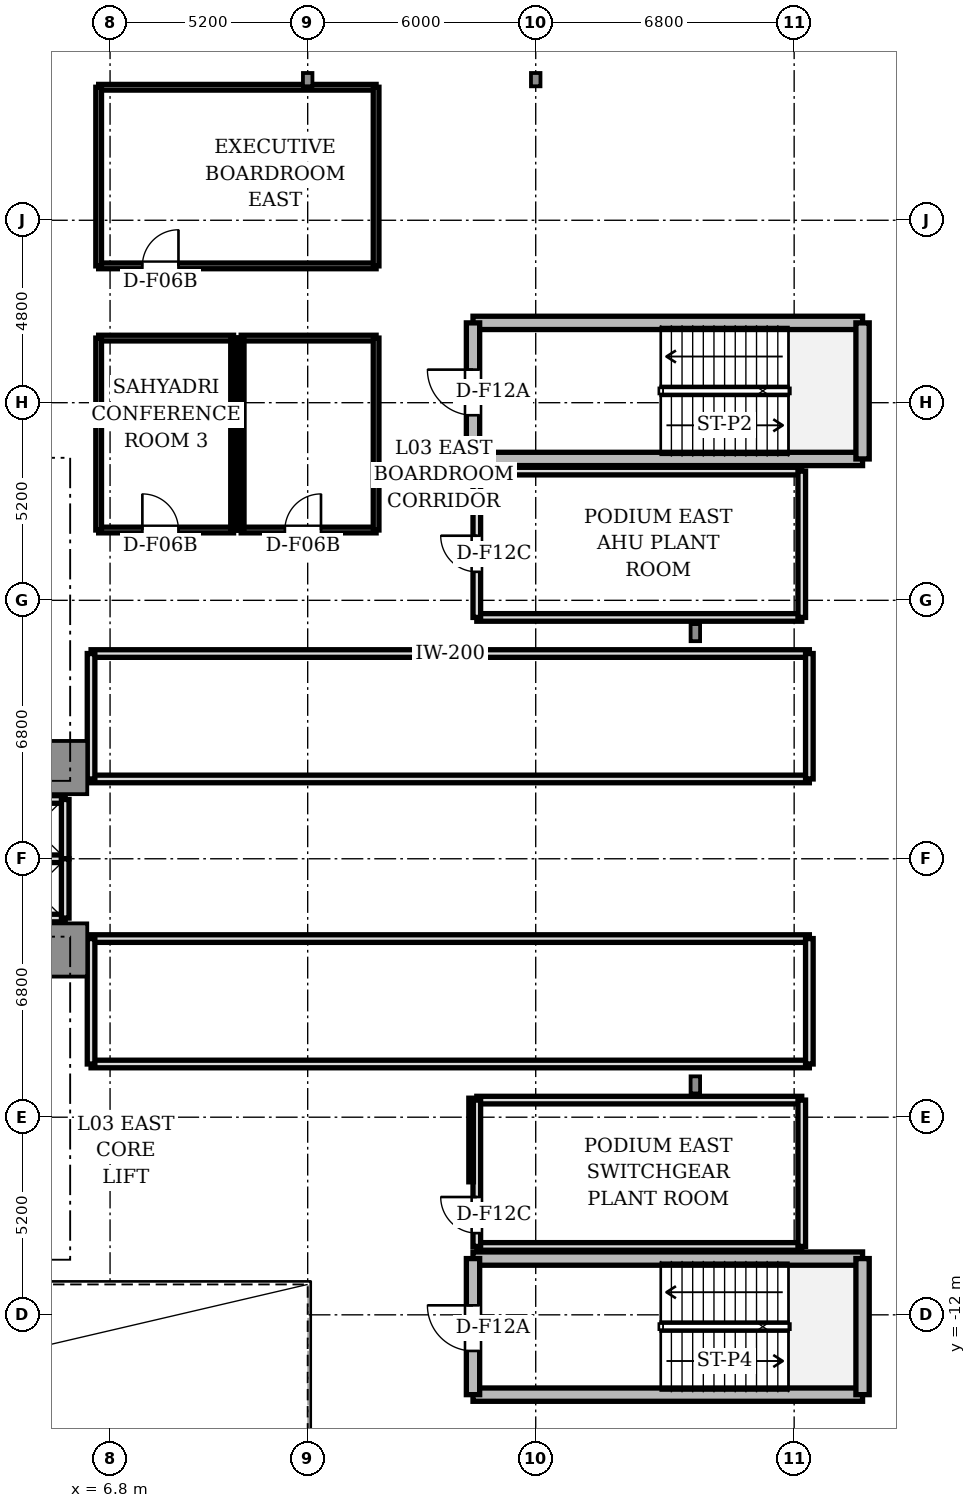
"""IFC4 building model, lengths in metres.
Left out: names, types, materials, properties, quantities, classifications, styles, units other than length and angle.
Written with IfcOpenShell. Run it as: python <this file> out.ifc"""

import sys

from ifc_helpers import new_model, si_unit, direction, frame, frame_2d, origin, origin_2d, place, context, subcontext, project, spatial, rectangle, i_section, extrude, source, transform, mapped, element, fill, save


model = new_model("IFC4")
c1 = context("Model", 3, precision=1e-05, world=origin(), true_north=direction((0.0, 1.0)))
c2 = subcontext(c1, "Body", "Model", "MODEL_VIEW")
j1 = project(units=[si_unit("LENGTHUNIT", "METRE"), si_unit("PLANEANGLEUNIT", "RADIAN")], contexts=[c1])
p1 = place(None, origin())
s1 = spatial("IfcSite", under=j1, at=p1, CompositionType="ELEMENT")
p2 = place(p1, origin())
s2 = spatial("IfcBuilding", under=s1, at=p2, CompositionType="ELEMENT")
p3 = place(p2, frame((0.0, 0.0, 14.1)))
s3 = spatial("IfcBuildingStorey", under=s2, at=p3, CompositionType="ELEMENT", Elevation=14.1)
m1 = source(origin(), c2, "Body", "SweptSolid", [
    extrude(rectangle(XDim=1.4, YDim=1.4, at=origin_2d()), origin(), (0.0, 0.0, 1.0), 4.18),
])
for number, where, z_axis, x_axis in (
    (1, (5.5, 2.4, 0.0), (0.0, 0.0, 1.0), (1.0, 0.0, 0.0)),
    (2, (5.5, -2.4, 0.0), (0.0, 0.0, 1.0), (1.0, 0.0, 0.0)),
):
    element("IfcColumn", number, at=place(p3, frame(where, z_axis=z_axis, x_axis=x_axis)), inside=s3, PredefinedType="COLUMN", context=c2, shape_type="MappedRepresentation", body=[
        mapped(m1, transform((0.0, 0.0, 0.0), scale=1.0)),
    ])
m2 = source(origin(), c2, "Body", "SweptSolid", [
    extrude(i_section(OverallWidth=0.25, OverallDepth=0.45, WebThickness=0.014, FlangeThickness=0.014, FilletRadius=0.015, at=origin_2d()), origin(), (0.0, 0.0, 1.0), 4.18),
])
for number, where, z_axis, x_axis in (
    (3, (22.2, -5.95, 0.0), (0.0, 0.0, 1.0), (1.0, 0.0, 0.0)),
    (4, (22.2, 5.95, 0.0), (0.0, 0.0, 1.0), (1.0, 0.0, 0.0)),
):
    element("IfcColumn", number, at=place(p3, frame(where, z_axis=z_axis, x_axis=x_axis)), inside=s3, PredefinedType="COLUMN", context=c2, shape_type="MappedRepresentation", body=[
        mapped(m2, transform((0.0, 0.0, 0.0), scale=1.0)),
    ])
m3 = source(origin(), c2, "Body", "SweptSolid", [
    extrude(i_section(OverallWidth=0.25, OverallDepth=0.35, WebThickness=0.012, FlangeThickness=0.012, FilletRadius=0.012, at=origin_2d()), origin(), (0.0, 0.0, 1.0), 4.18),
])
for number, where, z_axis, x_axis in (
    (5, (12.0, 20.5, 0.0), (0.0, 0.0, 1.0), (1.0, 0.0, 0.0)),
    (6, (18.0, 20.5, 0.0), (0.0, 0.0, 1.0), (1.0, 0.0, 0.0)),
):
    element("IfcColumn", number, at=place(p3, frame(where, z_axis=z_axis, x_axis=x_axis)), inside=s3, PredefinedType="COLUMN", context=c2, shape_type="MappedRepresentation", body=[
        mapped(m3, transform((0.0, 0.0, 0.0), scale=1.0)),
    ])
for number, where, z_axis, x_axis in (
    (7, (3.98, 1.56, 0.0), (0.0, 0.0, 1.0), (1.0, 0.0, 0.0)),
    (8, (3.98, -1.56, 0.0), (0.0, 0.0, 1.0), (1.0, 0.0, 0.0)),
    (9, (3.98, 0.0, 0.0), (0.0, 0.0, 1.0), (1.0, 0.0, 0.0)),
):
    element("IfcWall", number, at=place(p3, frame(where, z_axis=z_axis, x_axis=x_axis)), inside=s3, PredefinedType="SOLIDWALL", context=c2, shape_type="SweptSolid", body=[
        extrude(rectangle(XDim=1.64, YDim=0.2, at=frame_2d((0.82, 0.0))), origin(), (0.0, 0.0, 1.0), 3.73),
    ])
for number, where, z_axis, x_axis in (
    (10, (5.62, 0.0, 0.0), (0.0, 0.0, 1.0), (0.0, 1.0, 0.0)),
    (11, (5.62, -1.56, 0.0), (0.0, 0.0, 1.0), (0.0, 1.0, 0.0)),
):
    element("IfcWall", number, at=place(p3, frame(where, z_axis=z_axis, x_axis=x_axis)), inside=s3, PredefinedType="SOLIDWALL", context=c2, shape_type="SweptSolid", body=[
        extrude(rectangle(XDim=1.56, YDim=0.2, at=frame_2d((0.78, 0.0))), origin(), (0.0, 0.0, 1.0), 3.73),
    ])
for number, where, z_axis, x_axis in (
    (12, (16.35, 14.1, 0.0), (0.0, 0.0, 1.0), (1.0, 0.0, 0.0)),
    (13, (16.35, 10.52, 0.0), (0.0, 0.0, 1.0), (1.0, 0.0, 0.0)),
):
    element("IfcWall", number, at=place(p3, frame(where, z_axis=z_axis, x_axis=x_axis)), inside=s3, PredefinedType="SHEAR", context=c2, shape_type="SweptSolid", body=[
        extrude(rectangle(XDim=10.25, YDim=0.35, at=frame_2d((5.125, 0.0))), origin(), (0.0, 0.0, 1.0), 4.18),
    ])
p4 = place(p3, frame((16.35, 10.52, 0.0), z_axis=(0.0, 0.0, 1.0), x_axis=(0.0, 1.0, 0.0)))
e14 = element("IfcWall", 14, at=p4, inside=s3, PredefinedType="SHEAR", context=c2, shape_type="SweptSolid", body=[
    extrude(rectangle(XDim=3.58, YDim=0.35, at=frame_2d((1.79, 0.0))), origin(), (0.0, 0.0, 1.0), 4.18),
])
p5 = place(p4, frame((1.15, 0.0, 0.0)))
e15 = element("IfcOpeningElement", 15, at=p5, cuts=e14, PredefinedType="OPENING", context=c2, shape_type="SweptSolid", body=[
    extrude(rectangle(XDim=1.2, YDim=2.2, at=frame_2d((0.6, 1.1))), frame((0.0, 0.185, 0.0), z_axis=(0.0, -1.0, 0.0), x_axis=(1.0, 0.0, 0.0)), (0.0, 0.0, 1.0), 0.37),
])
p6 = place(p3, frame((26.6, 10.52, 0.0), z_axis=(0.0, 0.0, 1.0), x_axis=(0.0, 1.0, 0.0)))
e16 = element("IfcWall", 16, at=p6, inside=s3, PredefinedType="SHEAR", context=c2, shape_type="SweptSolid", body=[
    extrude(rectangle(XDim=3.58, YDim=0.35, at=frame_2d((1.79, 0.0))), origin(), (0.0, 0.0, 1.0), 4.18),
])
for number, where, z_axis, x_axis in (
    (17, (16.35, -10.52, 0.0), (0.0, 0.0, 1.0), (1.0, 0.0, 0.0)),
    (18, (16.35, -14.1, 0.0), (0.0, 0.0, 1.0), (1.0, 0.0, 0.0)),
):
    element("IfcWall", number, at=place(p3, frame(where, z_axis=z_axis, x_axis=x_axis)), inside=s3, PredefinedType="SHEAR", context=c2, shape_type="SweptSolid", body=[
        extrude(rectangle(XDim=10.25, YDim=0.35, at=frame_2d((5.125, 0.0))), origin(), (0.0, 0.0, 1.0), 4.18),
    ])
p7 = place(p3, frame((16.35, -14.1, 0.0), z_axis=(0.0, 0.0, 1.0), x_axis=(0.0, 1.0, 0.0)))
e19 = element("IfcWall", 19, at=p7, inside=s3, PredefinedType="SHEAR", context=c2, shape_type="SweptSolid", body=[
    extrude(rectangle(XDim=3.58, YDim=0.35, at=frame_2d((1.79, 0.0))), origin(), (0.0, 0.0, 1.0), 4.18),
])
p8 = place(p7, frame((1.15, 0.0, 0.0)))
e20 = element("IfcOpeningElement", 20, at=p8, cuts=e19, PredefinedType="OPENING", context=c2, shape_type="SweptSolid", body=[
    extrude(rectangle(XDim=1.2, YDim=2.2, at=frame_2d((0.6, 1.1))), frame((0.0, 0.185, 0.0), z_axis=(0.0, -1.0, 0.0), x_axis=(1.0, 0.0, 0.0)), (0.0, 0.0, 1.0), 0.37),
])
p9 = place(p3, frame((26.6, -14.1, 0.0), z_axis=(0.0, 0.0, 1.0), x_axis=(0.0, 1.0, 0.0)))
e21 = element("IfcWall", 21, at=p9, inside=s3, PredefinedType="SHEAR", context=c2, shape_type="SweptSolid", body=[
    extrude(rectangle(XDim=3.58, YDim=0.35, at=frame_2d((1.79, 0.0))), origin(), (0.0, 0.0, 1.0), 4.18),
])
for number, where, z_axis, x_axis in (
    (22, (6.3, 5.4, 0.0), (0.0, 0.0, 1.0), (1.0, 0.0, 0.0)),
    (23, (6.3, 2.1, 0.0), (0.0, 0.0, 1.0), (1.0, 0.0, 0.0)),
):
    element("IfcWall", number, at=place(p3, frame(where, z_axis=z_axis, x_axis=x_axis)), inside=s3, PredefinedType="SOLIDWALL", context=c2, shape_type="SweptSolid", body=[
        extrude(rectangle(XDim=18.9, YDim=0.2, at=frame_2d((9.45, 0.0))), origin(), (0.0, 0.0, 1.0), 3.25),
    ])
for number, where, z_axis, x_axis in (
    (24, (6.3, 2.1, 0.0), (0.0, 0.0, 1.0), (0.0, 1.0, 0.0)),
    (25, (25.2, 2.1, 0.0), (0.0, 0.0, 1.0), (0.0, 1.0, 0.0)),
):
    element("IfcWall", number, at=place(p3, frame(where, z_axis=z_axis, x_axis=x_axis)), inside=s3, PredefinedType="SOLIDWALL", context=c2, shape_type="SweptSolid", body=[
        extrude(rectangle(XDim=3.3, YDim=0.2, at=frame_2d((1.65, 0.0))), origin(), (0.0, 0.0, 1.0), 3.73),
    ])
for number, where, z_axis, x_axis in (
    (26, (6.3, -2.1, 0.0), (0.0, 0.0, 1.0), (1.0, 0.0, 0.0)),
    (27, (6.3, -5.4, 0.0), (0.0, 0.0, 1.0), (1.0, 0.0, 0.0)),
):
    element("IfcWall", number, at=place(p3, frame(where, z_axis=z_axis, x_axis=x_axis)), inside=s3, PredefinedType="SOLIDWALL", context=c2, shape_type="SweptSolid", body=[
        extrude(rectangle(XDim=18.9, YDim=0.2, at=frame_2d((9.45, 0.0))), origin(), (0.0, 0.0, 1.0), 3.25),
    ])
for number, where, z_axis, x_axis in (
    (28, (6.3, -5.4, 0.0), (0.0, 0.0, 1.0), (0.0, 1.0, 0.0)),
    (29, (25.2, -5.4, 0.0), (0.0, 0.0, 1.0), (0.0, 1.0, 0.0)),
):
    element("IfcWall", number, at=place(p3, frame(where, z_axis=z_axis, x_axis=x_axis)), inside=s3, PredefinedType="SOLIDWALL", context=c2, shape_type="SweptSolid", body=[
        extrude(rectangle(XDim=3.3, YDim=0.2, at=frame_2d((1.65, 0.0))), origin(), (0.0, 0.0, 1.0), 3.73),
    ])
p10 = place(p3, frame((16.45, 10.2, 0.0), z_axis=(0.0, 0.0, 1.0), x_axis=(1.0, 0.0, 0.0)))
e30 = element("IfcWall", 30, at=p10, inside=s3, PredefinedType="SOLIDWALL", context=c2, shape_type="SweptSolid", body=[
    extrude(rectangle(XDim=8.55, YDim=0.2, at=frame_2d((4.275, 0.0))), origin(), (0.0, 0.0, 1.0), 3.73),
])
p11 = place(p3, frame((16.45, 6.35, 0.0), z_axis=(0.0, 0.0, 1.0), x_axis=(1.0, 0.0, 0.0)))
e31 = element("IfcWall", 31, at=p11, inside=s3, PredefinedType="SOLIDWALL", context=c2, shape_type="SweptSolid", body=[
    extrude(rectangle(XDim=8.55, YDim=0.2, at=frame_2d((4.275, 0.0))), origin(), (0.0, 0.0, 1.0), 3.25),
])
p12 = place(p3, frame((16.45, 6.35, 0.0), z_axis=(0.0, 0.0, 1.0), x_axis=(0.0, 1.0, 0.0)))
e32 = element("IfcWall", 32, at=p12, inside=s3, PredefinedType="SOLIDWALL", context=c2, shape_type="SweptSolid", body=[
    extrude(rectangle(XDim=3.85, YDim=0.2, at=frame_2d((1.925, 0.0))), origin(), (0.0, 0.0, 1.0), 3.73),
])
p13 = place(p12, frame((1.2, 0.0, 0.0)))
e33 = element("IfcOpeningElement", 33, at=p13, cuts=e32, PredefinedType="OPENING", context=c2, shape_type="SweptSolid", body=[
    extrude(rectangle(XDim=0.95, YDim=2.15, at=frame_2d((0.475, 1.075))), frame((0.0, 0.11, 0.0), z_axis=(0.0, -1.0, 0.0), x_axis=(1.0, 0.0, 0.0)), (0.0, 0.0, 1.0), 0.22),
])
p14 = place(p3, frame((25.0, 6.35, 0.0), z_axis=(0.0, 0.0, 1.0), x_axis=(0.0, 1.0, 0.0)))
e34 = element("IfcWall", 34, at=p14, inside=s3, PredefinedType="SOLIDWALL", context=c2, shape_type="SweptSolid", body=[
    extrude(rectangle(XDim=3.85, YDim=0.2, at=frame_2d((1.925, 0.0))), origin(), (0.0, 0.0, 1.0), 3.73),
])
p15 = place(p3, frame((16.45, -6.35, 0.0), z_axis=(0.0, 0.0, 1.0), x_axis=(1.0, 0.0, 0.0)))
e35 = element("IfcWall", 35, at=p15, inside=s3, PredefinedType="SOLIDWALL", context=c2, shape_type="SweptSolid", body=[
    extrude(rectangle(XDim=8.55, YDim=0.2, at=frame_2d((4.275, 0.0))), origin(), (0.0, 0.0, 1.0), 3.25),
])
p16 = place(p3, frame((16.45, -10.2, 0.0), z_axis=(0.0, 0.0, 1.0), x_axis=(1.0, 0.0, 0.0)))
e36 = element("IfcWall", 36, at=p16, inside=s3, PredefinedType="SOLIDWALL", context=c2, shape_type="SweptSolid", body=[
    extrude(rectangle(XDim=8.55, YDim=0.2, at=frame_2d((4.275, 0.0))), origin(), (0.0, 0.0, 1.0), 3.73),
])
p17 = place(p3, frame((16.45, -10.2, 0.0), z_axis=(0.0, 0.0, 1.0), x_axis=(0.0, 1.0, 0.0)))
e37 = element("IfcWall", 37, at=p17, inside=s3, PredefinedType="SOLIDWALL", context=c2, shape_type="SweptSolid", body=[
    extrude(rectangle(XDim=3.85, YDim=0.2, at=frame_2d((1.925, 0.0))), origin(), (0.0, 0.0, 1.0), 3.73),
])
p18 = place(p17, frame((0.35, 0.0, 0.0)))
e38 = element("IfcOpeningElement", 38, at=p18, cuts=e37, PredefinedType="OPENING", context=c2, shape_type="SweptSolid", body=[
    extrude(rectangle(XDim=0.95, YDim=2.15, at=frame_2d((0.475, 1.075))), frame((0.0, 0.11, 0.0), z_axis=(0.0, -1.0, 0.0), x_axis=(1.0, 0.0, 0.0)), (0.0, 0.0, 1.0), 0.22),
])
p19 = place(p3, frame((25.0, -10.2, 0.0), z_axis=(0.0, 0.0, 1.0), x_axis=(0.0, 1.0, 0.0)))
e39 = element("IfcWall", 39, at=p19, inside=s3, PredefinedType="SOLIDWALL", context=c2, shape_type="SweptSolid", body=[
    extrude(rectangle(XDim=3.85, YDim=0.2, at=frame_2d((1.925, 0.0))), origin(), (0.0, 0.0, 1.0), 3.73),
])
p20 = place(p3, frame((6.5, 20.3, 0.0), z_axis=(0.0, 0.0, 1.0), x_axis=(1.0, 0.0, 0.0)))
e40 = element("IfcWall", 40, at=p20, inside=s3, PredefinedType="PARTITIONING", context=c2, shape_type="SweptSolid", body=[
    extrude(rectangle(XDim=7.3, YDim=0.15, at=frame_2d((3.65, 0.0))), origin(), (0.0, 0.0, 1.0), 3.65),
])
p21 = place(p3, frame((6.5, 15.6, 0.0), z_axis=(0.0, 0.0, 1.0), x_axis=(1.0, 0.0, 0.0)))
e41 = element("IfcWall", 41, at=p21, inside=s3, PredefinedType="PARTITIONING", context=c2, shape_type="SweptSolid", body=[
    extrude(rectangle(XDim=7.3, YDim=0.15, at=frame_2d((3.65, 0.0))), origin(), (0.0, 0.0, 1.0), 3.73),
])
p22 = place(p21, frame((1.15, 0.0, 0.0)))
e42 = element("IfcOpeningElement", 42, at=p22, cuts=e41, PredefinedType="OPENING", context=c2, shape_type="SweptSolid", body=[
    extrude(rectangle(XDim=0.95, YDim=2.15, at=frame_2d((0.475, 1.075))), frame((0.0, 0.085, 0.0), z_axis=(0.0, -1.0, 0.0), x_axis=(1.0, 0.0, 0.0)), (0.0, 0.0, 1.0), 0.17),
])
for number, where, z_axis, x_axis in (
    (43, (6.5, 15.6, 0.0), (0.0, 0.0, 1.0), (0.0, 1.0, 0.0)),
    (44, (13.8, 15.6, 0.0), (0.0, 0.0, 1.0), (0.0, 1.0, 0.0)),
):
    element("IfcWall", number, at=place(p3, frame(where, z_axis=z_axis, x_axis=x_axis)), inside=s3, PredefinedType="PARTITIONING", context=c2, shape_type="SweptSolid", body=[
        extrude(rectangle(XDim=4.7, YDim=0.15, at=frame_2d((2.35, 0.0))), origin(), (0.0, 0.0, 1.0), 3.73),
    ])
p23 = place(p3, frame((6.5, 13.7, 0.0), z_axis=(0.0, 0.0, 1.0), x_axis=(1.0, 0.0, 0.0)))
e45 = element("IfcWall", 45, at=p23, inside=s3, PredefinedType="PARTITIONING", context=c2, shape_type="SweptSolid", body=[
    extrude(rectangle(XDim=3.55, YDim=0.15, at=frame_2d((1.775, 0.0))), origin(), (0.0, 0.0, 1.0), 3.73),
])
p24 = place(p3, frame((6.5, 8.65, 0.0), z_axis=(0.0, 0.0, 1.0), x_axis=(1.0, 0.0, 0.0)))
e46 = element("IfcWall", 46, at=p24, inside=s3, PredefinedType="PARTITIONING", context=c2, shape_type="SweptSolid", body=[
    extrude(rectangle(XDim=3.55, YDim=0.15, at=frame_2d((1.775, 0.0))), origin(), (0.0, 0.0, 1.0), 3.73),
])
p25 = place(p24, frame((1.15, 0.0, 0.0)))
e47 = element("IfcOpeningElement", 47, at=p25, cuts=e46, PredefinedType="OPENING", context=c2, shape_type="SweptSolid", body=[
    extrude(rectangle(XDim=0.95, YDim=2.15, at=frame_2d((0.475, 1.075))), frame((0.0, 0.085, 0.0), z_axis=(0.0, -1.0, 0.0), x_axis=(1.0, 0.0, 0.0)), (0.0, 0.0, 1.0), 0.17),
])
for number, where, z_axis, x_axis in (
    (48, (6.5, 8.65, 0.0), (0.0, 0.0, 1.0), (0.0, 1.0, 0.0)),
    (49, (10.05, 8.65, 0.0), (0.0, 0.0, 1.0), (0.0, 1.0, 0.0)),
):
    element("IfcWall", number, at=place(p3, frame(where, z_axis=z_axis, x_axis=x_axis)), inside=s3, PredefinedType="PARTITIONING", context=c2, shape_type="SweptSolid", body=[
        extrude(rectangle(XDim=5.05, YDim=0.15, at=frame_2d((2.525, 0.0))), origin(), (0.0, 0.0, 1.0), 3.73),
    ])
p26 = place(p3, frame((10.25, 13.7, 0.0), z_axis=(0.0, 0.0, 1.0), x_axis=(1.0, 0.0, 0.0)))
e50 = element("IfcWall", 50, at=p26, inside=s3, PredefinedType="PARTITIONING", context=c2, shape_type="SweptSolid", body=[
    extrude(rectangle(XDim=3.55, YDim=0.15, at=frame_2d((1.775, 0.0))), origin(), (0.0, 0.0, 1.0), 3.73),
])
p27 = place(p3, frame((10.25, 8.65, 0.0), z_axis=(0.0, 0.0, 1.0), x_axis=(1.0, 0.0, 0.0)))
e51 = element("IfcWall", 51, at=p27, inside=s3, PredefinedType="PARTITIONING", context=c2, shape_type="SweptSolid", body=[
    extrude(rectangle(XDim=3.55, YDim=0.15, at=frame_2d((1.775, 0.0))), origin(), (0.0, 0.0, 1.0), 3.73),
])
p28 = place(p27, frame((1.15, 0.0, 0.0)))
e52 = element("IfcOpeningElement", 52, at=p28, cuts=e51, PredefinedType="OPENING", context=c2, shape_type="SweptSolid", body=[
    extrude(rectangle(XDim=0.95, YDim=2.15, at=frame_2d((0.475, 1.075))), frame((0.0, 0.085, 0.0), z_axis=(0.0, -1.0, 0.0), x_axis=(1.0, 0.0, 0.0)), (0.0, 0.0, 1.0), 0.17),
])
for number, where, z_axis, x_axis in (
    (53, (10.25, 8.65, 0.0), (0.0, 0.0, 1.0), (0.0, 1.0, 0.0)),
    (54, (13.8, 8.65, 0.0), (0.0, 0.0, 1.0), (0.0, 1.0, 0.0)),
):
    element("IfcWall", number, at=place(p3, frame(where, z_axis=z_axis, x_axis=x_axis)), inside=s3, PredefinedType="PARTITIONING", context=c2, shape_type="SweptSolid", body=[
        extrude(rectangle(XDim=5.05, YDim=0.15, at=frame_2d((2.525, 0.0))), origin(), (0.0, 0.0, 1.0), 3.73),
    ])
p29 = place(p3, frame((10.15, 8.65, 0.0), z_axis=(0.0, 0.0, 1.0), x_axis=(0.0, 1.0, 0.0)))
e55 = element("IfcWall", 55, at=p29, inside=s3, PredefinedType="MOVABLE", context=c2, shape_type="SweptSolid", body=[
    extrude(rectangle(XDim=5.05, YDim=0.12, at=frame_2d((2.525, 0.0))), origin(), (0.0, 0.0, 1.0), 3.73),
])
p30 = place(p3, frame((16.3, -8.5, 0.0), z_axis=(0.0, 0.0, 1.0), x_axis=(0.0, 1.0, 0.0)))
e56 = element("IfcWall", 56, at=p30, inside=s3, PredefinedType="MOVABLE", context=c2, shape_type="SweptSolid", body=[
    extrude(rectangle(XDim=2.2, YDim=0.12, at=frame_2d((1.1, 0.0))), origin(), (0.0, 0.0, 1.0), 3.73),
])
m4 = source(origin(), c2, "Body", "SweptSolid", [
    extrude(rectangle(XDim=1.2, YDim=0.05, at=origin_2d()), origin(), (0.0, 0.0, 1.0), 2.2),
])
p31 = place(p5, frame((0.6, 0.0, 0.0)))
e57 = element("IfcDoor", 57, at=p31, inside=s3, OperationType="SINGLE_SWING_RIGHT", PredefinedType="DOOR", context=c2, shape_type="MappedRepresentation", body=[
    mapped(m4, transform((0.0, 0.0, 0.0), scale=1.0)),
])
fill(e15, e57)
p32 = place(p8, frame((0.6, 0.0, 0.0)))
e58 = element("IfcDoor", 58, at=p32, inside=s3, OperationType="SINGLE_SWING_RIGHT", PredefinedType="DOOR", context=c2, shape_type="MappedRepresentation", body=[
    mapped(m4, transform((0.0, 0.0, 0.0), scale=1.0)),
])
fill(e20, e58)
m5 = source(origin(), c2, "Body", "SweptSolid", [
    extrude(rectangle(XDim=0.95, YDim=0.05, at=origin_2d()), origin(), (0.0, 0.0, 1.0), 2.15),
])
p33 = place(p13, frame((0.475, 0.0, 0.0)))
e59 = element("IfcDoor", 59, at=p33, inside=s3, OperationType="SINGLE_SWING_RIGHT", PredefinedType="DOOR", context=c2, shape_type="MappedRepresentation", body=[
    mapped(m5, transform((0.0, 0.0, 0.0), scale=1.0)),
])
fill(e33, e59)
p34 = place(p18, frame((0.475, 0.0, 0.0)))
e60 = element("IfcDoor", 60, at=p34, inside=s3, OperationType="SINGLE_SWING_RIGHT", PredefinedType="DOOR", context=c2, shape_type="MappedRepresentation", body=[
    mapped(m5, transform((0.0, 0.0, 0.0), scale=1.0)),
])
fill(e38, e60)
p35 = place(p22, frame((0.475, 0.0, 0.0)))
e61 = element("IfcDoor", 61, at=p35, inside=s3, OperationType="SINGLE_SWING_RIGHT", PredefinedType="DOOR", context=c2, shape_type="MappedRepresentation", body=[
    mapped(m5, transform((0.0, 0.0, 0.0), scale=1.0)),
])
fill(e42, e61)
p36 = place(p25, frame((0.475, 0.0, 0.0)))
e62 = element("IfcDoor", 62, at=p36, inside=s3, OperationType="SINGLE_SWING_LEFT", PredefinedType="DOOR", context=c2, shape_type="MappedRepresentation", body=[
    mapped(m5, transform((0.0, 0.0, 0.0), scale=1.0)),
])
fill(e47, e62)
p37 = place(p28, frame((0.475, 0.0, 0.0)))
e63 = element("IfcDoor", 63, at=p37, inside=s3, OperationType="SINGLE_SWING_RIGHT", PredefinedType="DOOR", context=c2, shape_type="MappedRepresentation", body=[
    mapped(m5, transform((0.0, 0.0, 0.0), scale=1.0)),
])
fill(e52, e63)
save(model, sys.argv[1])
